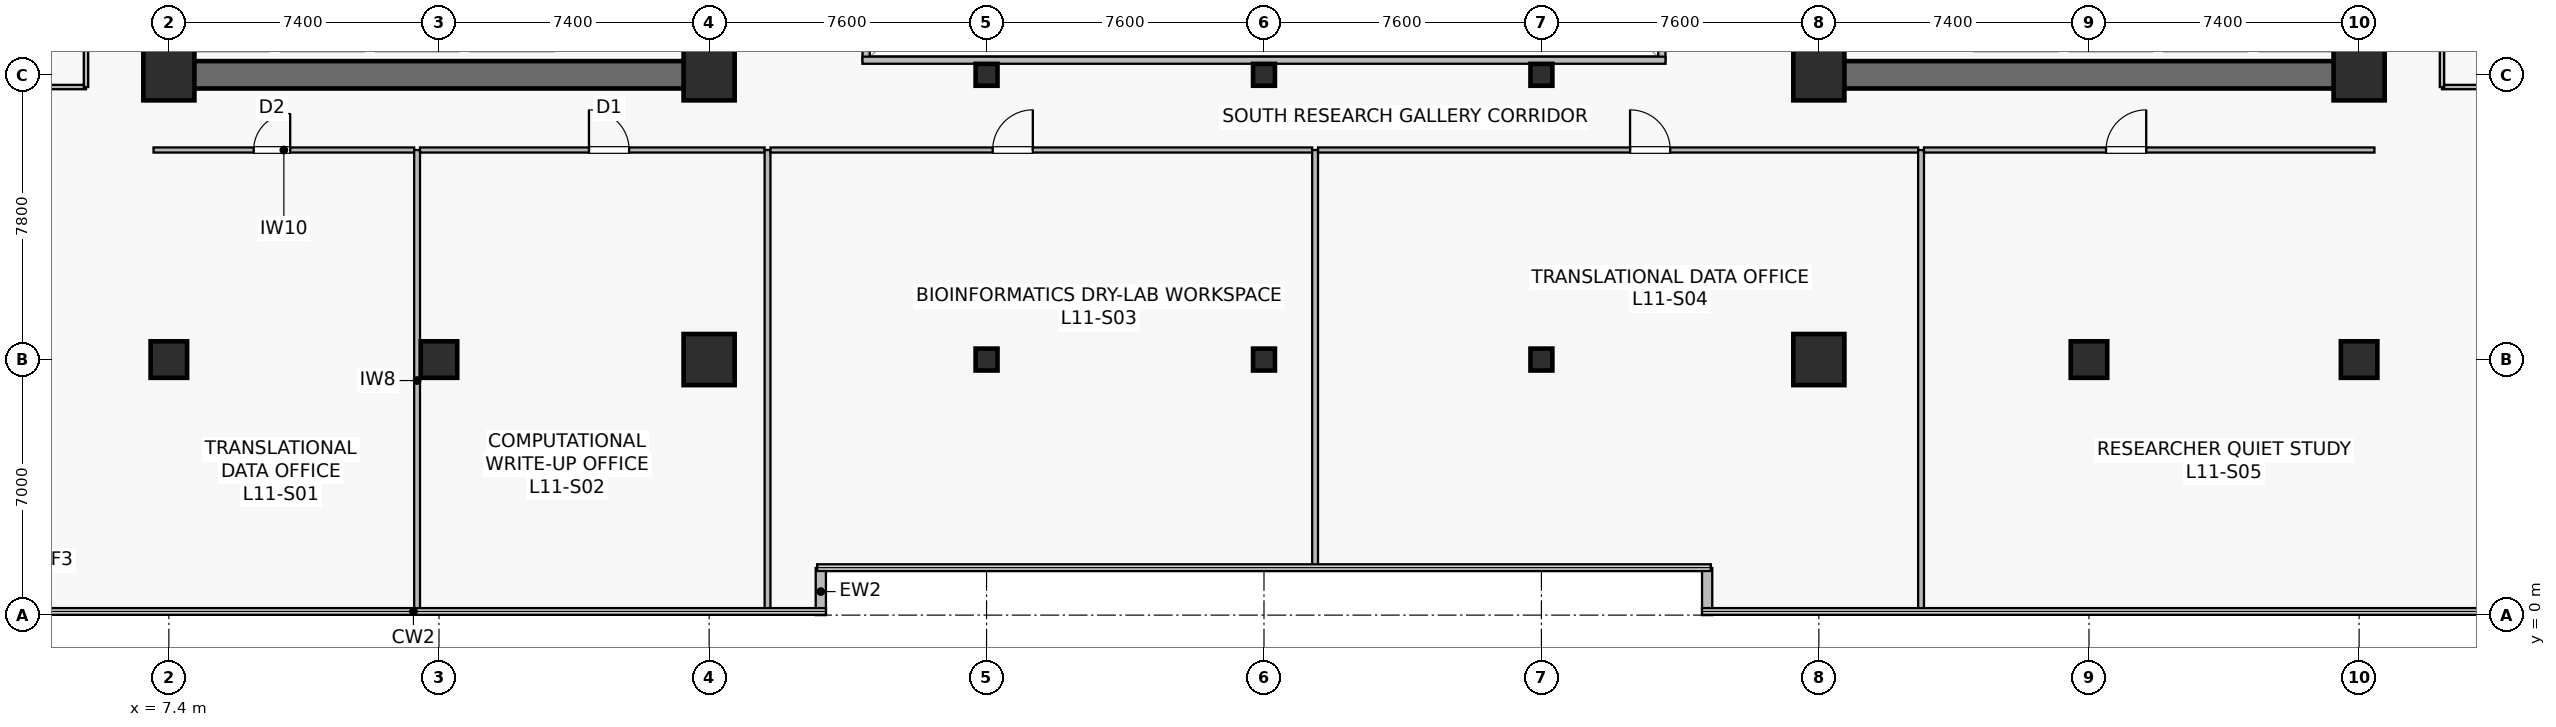
"""IFC4 building model, lengths in metres.
Left out: names, types, materials, properties, quantities, classifications, styles, units other than length and angle.
Written with IfcOpenShell. Run it as: python <this file> out.ifc"""

import sys

from ifc_helpers import new_model, si_unit, direction, frame, frame_2d, origin, origin_2d, place, context, subcontext, project, spatial, rectangle, hollow_rectangle, extrude, source, transform, mapped, element, fill, save


model = new_model("IFC4")
c1 = context("Model", 3, precision=1e-05, world=origin(), true_north=direction((0.0, 1.0)))
c2 = subcontext(c1, "Body", "Model", "MODEL_VIEW")
j1 = project(units=[si_unit("LENGTHUNIT", "METRE"), si_unit("PLANEANGLEUNIT", "RADIAN")], contexts=[c1])
p1 = place(None, origin())
s1 = spatial("IfcSite", under=j1, at=p1, CompositionType="ELEMENT")
p2 = place(p1, origin())
s2 = spatial("IfcBuilding", under=s1, at=p2, CompositionType="ELEMENT")
p3 = place(p2, frame((0.0, 0.0, 45.7)))
s3 = spatial("IfcBuildingStorey", under=s2, at=p3, CompositionType="ELEMENT", Elevation=45.7)
p4 = place(p3, frame((7.025, 14.8, 0.0), z_axis=(0.0, 0.0, 1.0), x_axis=(1.0, 0.0, 0.0)))
e1 = element("IfcWall", 1, at=p4, inside=s3, PredefinedType="SHEAR", context=c2, shape_type="SweptSolid", body=[
    extrude(rectangle(XDim=15.55, YDim=0.75, at=frame_2d((7.775, 0.0))), origin(), (0.0, 0.0, 1.0), 3.78),
])
p5 = place(p3, frame((7.4, 15.175, 0.0), z_axis=(0.0, 0.0, 1.0), x_axis=(0.0, 1.0, 0.0)))
e2 = element("IfcWall", 2, at=p5, inside=s3, PredefinedType="SHEAR", context=c2, shape_type="SweptSolid", body=[
    extrude(rectangle(XDim=18.25, YDim=0.75, at=frame_2d((9.125, 0.0))), origin(), (0.0, 0.0, 1.0), 3.78),
])
p6 = place(p3, frame((22.2, 15.175, 0.0), z_axis=(0.0, 0.0, 1.0), x_axis=(0.0, 1.0, 0.0)))
e3 = element("IfcWall", 3, at=p6, inside=s3, PredefinedType="SHEAR", context=c2, shape_type="SweptSolid", body=[
    extrude(rectangle(XDim=18.25, YDim=0.75, at=frame_2d((9.125, 0.0))), origin(), (0.0, 0.0, 1.0), 3.78),
])
p7 = place(p6, frame((3.375, 0.0, 0.0)))
e4 = element("IfcOpeningElement", 4, at=p7, cuts=e3, PredefinedType="OPENING", context=c2, shape_type="SweptSolid", body=[
    extrude(rectangle(XDim=1.42, YDim=2.2, at=frame_2d((0.71, 1.1))), frame((0.0, 0.385, 0.0), z_axis=(0.0, -1.0, 0.0), x_axis=(1.0, 0.0, 0.0)), (0.0, 0.0, 1.0), 0.77),
])
p8 = place(p3, frame((52.225, 14.8, 0.0), z_axis=(0.0, 0.0, 1.0), x_axis=(1.0, 0.0, 0.0)))
e5 = element("IfcWall", 5, at=p8, inside=s3, PredefinedType="SHEAR", context=c2, shape_type="SweptSolid", body=[
    extrude(rectangle(XDim=15.55, YDim=0.75, at=frame_2d((7.775, 0.0))), origin(), (0.0, 0.0, 1.0), 3.78),
])
p9 = place(p3, frame((52.6, 15.175, 0.0), z_axis=(0.0, 0.0, 1.0), x_axis=(0.0, 1.0, 0.0)))
e6 = element("IfcWall", 6, at=p9, inside=s3, PredefinedType="SHEAR", context=c2, shape_type="SweptSolid", body=[
    extrude(rectangle(XDim=18.25, YDim=0.75, at=frame_2d((9.125, 0.0))), origin(), (0.0, 0.0, 1.0), 3.78),
])
p10 = place(p9, frame((3.375, 0.0, 0.0)))
e7 = element("IfcOpeningElement", 7, at=p10, cuts=e6, PredefinedType="OPENING", context=c2, shape_type="SweptSolid", body=[
    extrude(rectangle(XDim=1.42, YDim=2.2, at=frame_2d((0.71, 1.1))), frame((0.0, 0.385, 0.0), z_axis=(0.0, -1.0, 0.0), x_axis=(1.0, 0.0, 0.0)), (0.0, 0.0, 1.0), 0.77),
])
p11 = place(p3, frame((67.4, 15.175, 0.0), z_axis=(0.0, 0.0, 1.0), x_axis=(0.0, 1.0, 0.0)))
e8 = element("IfcWall", 8, at=p11, inside=s3, PredefinedType="SHEAR", context=c2, shape_type="SweptSolid", body=[
    extrude(rectangle(XDim=18.25, YDim=0.75, at=frame_2d((9.125, 0.0))), origin(), (0.0, 0.0, 1.0), 3.78),
])
m1 = source(origin(), c2, "Body", "SweptSolid", [
    extrude(rectangle(XDim=1.0, YDim=1.0, at=origin_2d()), origin(), (0.0, 0.0, 1.0), 4.1),
])
p12 = place(p3, frame((14.8, 7.0, 0.0), z_axis=(0.0, 0.0, 1.0), x_axis=(1.0, 0.0, 0.0)))
e9 = element("IfcColumn", 9, at=p12, inside=s3, PredefinedType="COLUMN", context=c2, shape_type="MappedRepresentation", body=[
    mapped(m1, transform((0.0, 0.0, 0.0), scale=1.0)),
])
m2 = source(origin(), c2, "Body", "SweptSolid", [
    extrude(rectangle(XDim=1.4, YDim=1.4, at=origin_2d()), origin(), (0.0, 0.0, 1.0), 4.1),
])
for number, where, z_axis, x_axis in (
    (10, (22.2, 7.0, 0.0), (0.0, 0.0, 1.0), (1.0, 0.0, 0.0)),
    (11, (7.4, 14.8, 0.0), (0.0, 0.0, 1.0), (1.0, 0.0, 0.0)),
    (12, (22.2, 14.8, 0.0), (0.0, 0.0, 1.0), (1.0, 0.0, 0.0)),
    (13, (52.6, 7.0, 0.0), (0.0, 0.0, 1.0), (1.0, 0.0, 0.0)),
):
    element("IfcColumn", number, at=place(p3, frame(where, z_axis=z_axis, x_axis=x_axis)), inside=s3, PredefinedType="COLUMN", context=c2, shape_type="MappedRepresentation", body=[
        mapped(m2, transform((0.0, 0.0, 0.0), scale=1.0)),
    ])
p13 = place(p3, frame((60.0, 7.0, 0.0), z_axis=(0.0, 0.0, 1.0), x_axis=(1.0, 0.0, 0.0)))
e14 = element("IfcColumn", 14, at=p13, inside=s3, PredefinedType="COLUMN", context=c2, shape_type="MappedRepresentation", body=[
    mapped(m1, transform((0.0, 0.0, 0.0), scale=1.0)),
])
for number, where, z_axis, x_axis in (
    (15, (52.6, 14.8, 0.0), (0.0, 0.0, 1.0), (1.0, 0.0, 0.0)),
    (16, (67.4, 14.8, 0.0), (0.0, 0.0, 1.0), (1.0, 0.0, 0.0)),
):
    element("IfcColumn", number, at=place(p3, frame(where, z_axis=z_axis, x_axis=x_axis)), inside=s3, PredefinedType="COLUMN", context=c2, shape_type="MappedRepresentation", body=[
        mapped(m2, transform((0.0, 0.0, 0.0), scale=1.0)),
    ])
for number, where, z_axis, x_axis in (
    (17, (7.4, 7.0, 0.0), (0.0, 0.0, 1.0), (1.0, 0.0, 0.0)),
    (18, (67.4, 7.0, 0.0), (0.0, 0.0, 1.0), (1.0, 0.0, 0.0)),
):
    element("IfcColumn", number, at=place(p3, frame(where, z_axis=z_axis, x_axis=x_axis)), inside=s3, PredefinedType="COLUMN", context=c2, shape_type="MappedRepresentation", body=[
        mapped(m1, transform((0.0, 0.0, 0.0), scale=1.0)),
    ])
m3 = source(origin(), c2, "Body", "SweptSolid", [
    extrude(hollow_rectangle(XDim=0.6, YDim=0.6, WallThickness=0.028, at=origin_2d()), origin(), (0.0, 0.0, 1.0), 4.1),
])
for number, where, z_axis, x_axis in (
    (19, (29.8, 7.0, 0.0), (0.0, 0.0, 1.0), (1.0, 0.0, 0.0)),
    (20, (29.8, 14.8, 0.0), (0.0, 0.0, 1.0), (1.0, 0.0, 0.0)),
    (21, (37.4, 7.0, 0.0), (0.0, 0.0, 1.0), (1.0, 0.0, 0.0)),
    (22, (37.4, 14.8, 0.0), (0.0, 0.0, 1.0), (1.0, 0.0, 0.0)),
    (23, (45.0, 7.0, 0.0), (0.0, 0.0, 1.0), (1.0, 0.0, 0.0)),
    (24, (45.0, 14.8, 0.0), (0.0, 0.0, 1.0), (1.0, 0.0, 0.0)),
):
    element("IfcColumn", number, at=place(p3, frame(where, z_axis=z_axis, x_axis=x_axis)), inside=s3, PredefinedType="COLUMN", context=c2, shape_type="MappedRepresentation", body=[
        mapped(m3, transform((0.0, 0.0, 0.0), scale=1.0)),
    ])
for number, where, z_axis, x_axis in (
    (25, (25.26, 0.0, 0.0), (0.0, 0.0, 1.0), (0.0, 1.0, 0.0)),
    (26, (49.54, 1.288, 0.0), (0.0, 0.0, 1.0), (0.0, -1.0, 0.0)),
):
    element("IfcWall", number, at=place(p3, frame(where, z_axis=z_axis, x_axis=x_axis)), inside=s3, PredefinedType="STANDARD", context=c2, shape_type="SweptSolid", body=[
        extrude(rectangle(XDim=1.288, YDim=0.28, at=frame_2d((0.644, 0.0))), origin(), (0.0, 0.0, 1.0), 3.78),
    ])
p14 = place(p3, frame((26.5, 15.2, 0.0), z_axis=(0.0, 0.0, 1.0), x_axis=(0.0, 1.0, 0.0)))
e27 = element("IfcWall", 27, at=p14, inside=s3, PredefinedType="SOLIDWALL", context=c2, shape_type="SweptSolid", body=[
    extrude(rectangle(XDim=18.2, YDim=0.195, at=frame_2d((9.1, 0.0))), origin(), (0.0, 0.0, 1.0), 3.78),
])
p15 = place(p14, frame((1.8, 0.0, 0.9)))
e28 = element("IfcOpeningElement", 28, at=p15, cuts=e27, PredefinedType="OPENING", context=c2, shape_type="SweptSolid", body=[
    extrude(rectangle(XDim=1.2, YDim=1.35, at=frame_2d((0.6, 0.675))), frame((0.0, 0.107, 0.0), z_axis=(0.0, -1.0, 0.0), x_axis=(1.0, 0.0, 0.0)), (0.0, 0.0, 1.0), 0.215),
])
p16 = place(p14, frame((13.2, 0.0, 0.9)))
e29 = element("IfcOpeningElement", 29, at=p16, cuts=e27, PredefinedType="OPENING", context=c2, shape_type="SweptSolid", body=[
    extrude(rectangle(XDim=1.2, YDim=1.35, at=frame_2d((0.6, 0.675))), frame((0.0, 0.107, 0.0), z_axis=(0.0, -1.0, 0.0), x_axis=(1.0, 0.0, 0.0)), (0.0, 0.0, 1.0), 0.215),
])
p17 = place(p3, frame((48.3, 15.2, 0.0), z_axis=(0.0, 0.0, 1.0), x_axis=(0.0, 1.0, 0.0)))
e30 = element("IfcWall", 30, at=p17, inside=s3, PredefinedType="SOLIDWALL", context=c2, shape_type="SweptSolid", body=[
    extrude(rectangle(XDim=18.2, YDim=0.195, at=frame_2d((9.1, 0.0))), origin(), (0.0, 0.0, 1.0), 3.78),
])
p18 = place(p17, frame((1.8, 0.0, 0.9)))
e31 = element("IfcOpeningElement", 31, at=p18, cuts=e30, PredefinedType="OPENING", context=c2, shape_type="SweptSolid", body=[
    extrude(rectangle(XDim=1.2, YDim=1.35, at=frame_2d((0.6, 0.675))), frame((0.0, 0.107, 0.0), z_axis=(0.0, -1.0, 0.0), x_axis=(1.0, 0.0, 0.0)), (0.0, 0.0, 1.0), 0.215),
])
p19 = place(p17, frame((13.2, 0.0, 0.9)))
e32 = element("IfcOpeningElement", 32, at=p19, cuts=e30, PredefinedType="OPENING", context=c2, shape_type="SweptSolid", body=[
    extrude(rectangle(XDim=1.2, YDim=1.35, at=frame_2d((0.6, 0.675))), frame((0.0, 0.107, 0.0), z_axis=(0.0, -1.0, 0.0), x_axis=(1.0, 0.0, 0.0)), (0.0, 0.0, 1.0), 0.215),
])
p20 = place(p3, frame((26.4, 15.2, 0.0), z_axis=(0.0, 0.0, 1.0), x_axis=(1.0, 0.0, 0.0)))
e33 = element("IfcWall", 33, at=p20, inside=s3, PredefinedType="SOLIDWALL", context=c2, shape_type="SweptSolid", body=[
    extrude(rectangle(XDim=22.0, YDim=0.195, at=frame_2d((11.0, 0.0))), origin(), (0.0, 0.0, 1.0), 3.78),
])
p21 = place(p3, frame((6.98, 12.74, 0.0), z_axis=(0.0, 0.0, 1.0), x_axis=(1.0, 0.0, 0.0)))
e34 = element("IfcWall", 34, at=p21, inside=s3, PredefinedType="PARTITIONING", context=c2, shape_type="SweptSolid", body=[
    extrude(rectangle(XDim=7.14, YDim=0.14, at=frame_2d((3.57, 0.0))), origin(), (0.0, 0.0, 1.0), 3.265),
])
p22 = place(p21, frame((2.744, 0.0, 0.0)))
e35 = element("IfcOpeningElement", 35, at=p22, cuts=e34, PredefinedType="OPENING", context=c2, shape_type="SweptSolid", body=[
    extrude(rectangle(XDim=1.0, YDim=2.15, at=frame_2d((0.5, 1.075))), frame((0.0, 0.08, 0.0), z_axis=(0.0, -1.0, 0.0), x_axis=(1.0, 0.0, 0.0)), (0.0, 0.0, 1.0), 0.16),
])
p23 = place(p3, frame((14.2, 0.11, 0.0), z_axis=(0.0, 0.0, 1.0), x_axis=(0.0, 1.0, 0.0)))
e36 = element("IfcWall", 36, at=p23, inside=s3, PredefinedType="PARTITIONING", context=c2, shape_type="SweptSolid", body=[
    extrude(rectangle(XDim=12.63, YDim=0.16, at=frame_2d((6.315, 0.0))), origin(), (0.0, 0.0, 1.0), 3.015),
])
p24 = place(p3, frame((14.28, 12.74, 0.0), z_axis=(0.0, 0.0, 1.0), x_axis=(1.0, 0.0, 0.0)))
e37 = element("IfcWall", 37, at=p24, inside=s3, PredefinedType="PARTITIONING", context=c2, shape_type="SweptSolid", body=[
    extrude(rectangle(XDim=9.44, YDim=0.14, at=frame_2d((4.72, 0.0))), origin(), (0.0, 0.0, 1.0), 3.065),
])
p25 = place(p24, frame((4.628, 0.0, 0.0)))
e38 = element("IfcOpeningElement", 38, at=p25, cuts=e37, PredefinedType="OPENING", context=c2, shape_type="SweptSolid", body=[
    extrude(rectangle(XDim=1.1, YDim=2.18, at=frame_2d((0.55, 1.09))), frame((0.0, 0.08, 0.0), z_axis=(0.0, -1.0, 0.0), x_axis=(1.0, 0.0, 0.0)), (0.0, 0.0, 1.0), 0.16),
])
p26 = place(p3, frame((23.8, 0.11, 0.0), z_axis=(0.0, 0.0, 1.0), x_axis=(0.0, 1.0, 0.0)))
e39 = element("IfcWall", 39, at=p26, inside=s3, PredefinedType="PARTITIONING", context=c2, shape_type="SweptSolid", body=[
    extrude(rectangle(XDim=12.63, YDim=0.16, at=frame_2d((6.315, 0.0))), origin(), (0.0, 0.0, 1.0), 3.015),
])
p27 = place(p3, frame((23.88, 12.74, 0.0), z_axis=(0.0, 0.0, 1.0), x_axis=(1.0, 0.0, 0.0)))
e40 = element("IfcWall", 40, at=p27, inside=s3, PredefinedType="PARTITIONING", context=c2, shape_type="SweptSolid", body=[
    extrude(rectangle(XDim=14.84, YDim=0.14, at=frame_2d((7.42, 0.0))), origin(), (0.0, 0.0, 1.0), 3.065),
])
p28 = place(p27, frame((6.088, 0.0, 0.0)))
e41 = element("IfcOpeningElement", 41, at=p28, cuts=e40, PredefinedType="OPENING", context=c2, shape_type="SweptSolid", body=[
    extrude(rectangle(XDim=1.1, YDim=2.18, at=frame_2d((0.55, 1.09))), frame((0.0, 0.08, 0.0), z_axis=(0.0, -1.0, 0.0), x_axis=(1.0, 0.0, 0.0)), (0.0, 0.0, 1.0), 0.16),
])
p29 = place(p3, frame((38.8, 1.31, 0.0), z_axis=(0.0, 0.0, 1.0), x_axis=(0.0, 1.0, 0.0)))
e42 = element("IfcWall", 42, at=p29, inside=s3, PredefinedType="PARTITIONING", context=c2, shape_type="SweptSolid", body=[
    extrude(rectangle(XDim=11.43, YDim=0.16, at=frame_2d((5.715, 0.0))), origin(), (0.0, 0.0, 1.0), 3.015),
])
p30 = place(p3, frame((38.88, 12.74, 0.0), z_axis=(0.0, 0.0, 1.0), x_axis=(1.0, 0.0, 0.0)))
e43 = element("IfcWall", 43, at=p30, inside=s3, PredefinedType="PARTITIONING", context=c2, shape_type="SweptSolid", body=[
    extrude(rectangle(XDim=16.44, YDim=0.14, at=frame_2d((8.22, 0.0))), origin(), (0.0, 0.0, 1.0), 3.065),
])
p31 = place(p30, frame((8.548, 0.0, 0.0)))
e44 = element("IfcOpeningElement", 44, at=p31, cuts=e43, PredefinedType="OPENING", context=c2, shape_type="SweptSolid", body=[
    extrude(rectangle(XDim=1.1, YDim=2.18, at=frame_2d((0.55, 1.09))), frame((0.0, 0.08, 0.0), z_axis=(0.0, -1.0, 0.0), x_axis=(1.0, 0.0, 0.0)), (0.0, 0.0, 1.0), 0.16),
])
p32 = place(p3, frame((55.4, 0.11, 0.0), z_axis=(0.0, 0.0, 1.0), x_axis=(0.0, 1.0, 0.0)))
e45 = element("IfcWall", 45, at=p32, inside=s3, PredefinedType="PARTITIONING", context=c2, shape_type="SweptSolid", body=[
    extrude(rectangle(XDim=12.63, YDim=0.16, at=frame_2d((6.315, 0.0))), origin(), (0.0, 0.0, 1.0), 3.015),
])
p33 = place(p3, frame((55.48, 12.74, 0.0), z_axis=(0.0, 0.0, 1.0), x_axis=(1.0, 0.0, 0.0)))
e46 = element("IfcWall", 46, at=p33, inside=s3, PredefinedType="PARTITIONING", context=c2, shape_type="SweptSolid", body=[
    extrude(rectangle(XDim=12.34, YDim=0.14, at=frame_2d((6.17, 0.0))), origin(), (0.0, 0.0, 1.0), 3.065),
])
p34 = place(p33, frame((4.988, 0.0, 0.0)))
e47 = element("IfcOpeningElement", 47, at=p34, cuts=e46, PredefinedType="OPENING", context=c2, shape_type="SweptSolid", body=[
    extrude(rectangle(XDim=1.1, YDim=2.18, at=frame_2d((0.55, 1.09))), frame((0.0, 0.08, 0.0), z_axis=(0.0, -1.0, 0.0), x_axis=(1.0, 0.0, 0.0)), (0.0, 0.0, 1.0), 0.16),
])
p35 = place(p3, frame((0.11, 14.465, 0.0), z_axis=(0.0, 0.0, 1.0), x_axis=(1.0, 0.0, 0.0)))
e48 = element("IfcWall", 48, at=p35, inside=s3, PredefinedType="PARTITIONING", context=c2, shape_type="SweptSolid", body=[
    extrude(rectangle(XDim=5.02, YDim=0.12, at=frame_2d((2.51, 0.0))), origin(), (0.0, 0.0, 1.0), 3.78),
])
p36 = place(p3, frame((5.13, 14.465, 0.0), z_axis=(0.0, 0.0, 1.0), x_axis=(0.0, 1.0, 0.0)))
e49 = element("IfcWall", 49, at=p36, inside=s3, PredefinedType="PARTITIONING", context=c2, shape_type="SweptSolid", body=[
    extrude(rectangle(XDim=10.675, YDim=0.12, at=frame_2d((5.337, 0.0))), origin(), (0.0, 0.0, 1.0), 3.78),
])
p37 = place(p36, frame((4.887, 0.0, 0.0)))
e50 = element("IfcOpeningElement", 50, at=p37, cuts=e49, PredefinedType="OPENING", context=c2, shape_type="SweptSolid", body=[
    extrude(rectangle(XDim=0.9, YDim=2.1, at=frame_2d((0.45, 1.05))), frame((0.0, 0.07, 0.0), z_axis=(0.0, -1.0, 0.0), x_axis=(1.0, 0.0, 0.0)), (0.0, 0.0, 1.0), 0.14),
])
p38 = place(p3, frame((69.67, 14.465, 0.0), z_axis=(0.0, 0.0, 1.0), x_axis=(1.0, 0.0, 0.0)))
e51 = element("IfcWall", 51, at=p38, inside=s3, PredefinedType="PARTITIONING", context=c2, shape_type="SweptSolid", body=[
    extrude(rectangle(XDim=5.02, YDim=0.12, at=frame_2d((2.51, 0.0))), origin(), (0.0, 0.0, 1.0), 3.78),
])
p39 = place(p3, frame((69.67, 14.465, 0.0), z_axis=(0.0, 0.0, 1.0), x_axis=(0.0, 1.0, 0.0)))
e52 = element("IfcWall", 52, at=p39, inside=s3, PredefinedType="PARTITIONING", context=c2, shape_type="SweptSolid", body=[
    extrude(rectangle(XDim=5.075, YDim=0.12, at=frame_2d((2.538, 0.0))), origin(), (0.0, 0.0, 1.0), 3.78),
])
p40 = place(p39, frame((2.087, 0.0, 0.0)))
e53 = element("IfcOpeningElement", 53, at=p40, cuts=e52, PredefinedType="OPENING", context=c2, shape_type="SweptSolid", body=[
    extrude(rectangle(XDim=0.9, YDim=2.1, at=frame_2d((0.45, 1.05))), frame((0.0, 0.07, 0.0), z_axis=(0.0, -1.0, 0.0), x_axis=(1.0, 0.0, 0.0)), (0.0, 0.0, 1.0), 0.14),
])
m4 = source(origin(), c2, "Body", "SweptSolid", [
    extrude(rectangle(XDim=1.0, YDim=2.15, at=frame_2d((0.5, 1.075))), frame((0.0, 0.025, 0.0), z_axis=(0.0, -1.0, 0.0), x_axis=(1.0, 0.0, 0.0)), (0.0, 0.0, 1.0), 0.05),
])
p41 = place(p22, origin())
e54 = element("IfcDoor", 54, at=p41, inside=s3, OperationType="SINGLE_SWING_RIGHT", PredefinedType="DOOR", context=c2, shape_type="MappedRepresentation", body=[
    mapped(m4, transform((0.0, 0.0, 0.0), scale=1.0)),
])
fill(e35, e54)
m5 = source(origin(), c2, "Body", "SweptSolid", [
    extrude(rectangle(XDim=1.1, YDim=2.18, at=frame_2d((0.55, 1.09))), frame((0.0, 0.025, 0.0), z_axis=(0.0, -1.0, 0.0), x_axis=(1.0, 0.0, 0.0)), (0.0, 0.0, 1.0), 0.05),
])
p42 = place(p25, origin())
e55 = element("IfcDoor", 55, at=p42, inside=s3, OperationType="SINGLE_SWING_LEFT", PredefinedType="DOOR", context=c2, shape_type="MappedRepresentation", body=[
    mapped(m5, transform((0.0, 0.0, 0.0), scale=1.0)),
])
fill(e38, e55)
p43 = place(p28, origin())
e56 = element("IfcDoor", 56, at=p43, inside=s3, OperationType="SINGLE_SWING_RIGHT", PredefinedType="DOOR", context=c2, shape_type="MappedRepresentation", body=[
    mapped(m5, transform((0.0, 0.0, 0.0), scale=1.0)),
])
fill(e41, e56)
p44 = place(p31, origin())
e57 = element("IfcDoor", 57, at=p44, inside=s3, OperationType="SINGLE_SWING_LEFT", PredefinedType="DOOR", context=c2, shape_type="MappedRepresentation", body=[
    mapped(m5, transform((0.0, 0.0, 0.0), scale=1.0)),
])
fill(e44, e57)
p45 = place(p34, origin())
e58 = element("IfcDoor", 58, at=p45, inside=s3, OperationType="SINGLE_SWING_RIGHT", PredefinedType="DOOR", context=c2, shape_type="MappedRepresentation", body=[
    mapped(m5, transform((0.0, 0.0, 0.0), scale=1.0)),
])
fill(e47, e58)
save(model, sys.argv[1])
